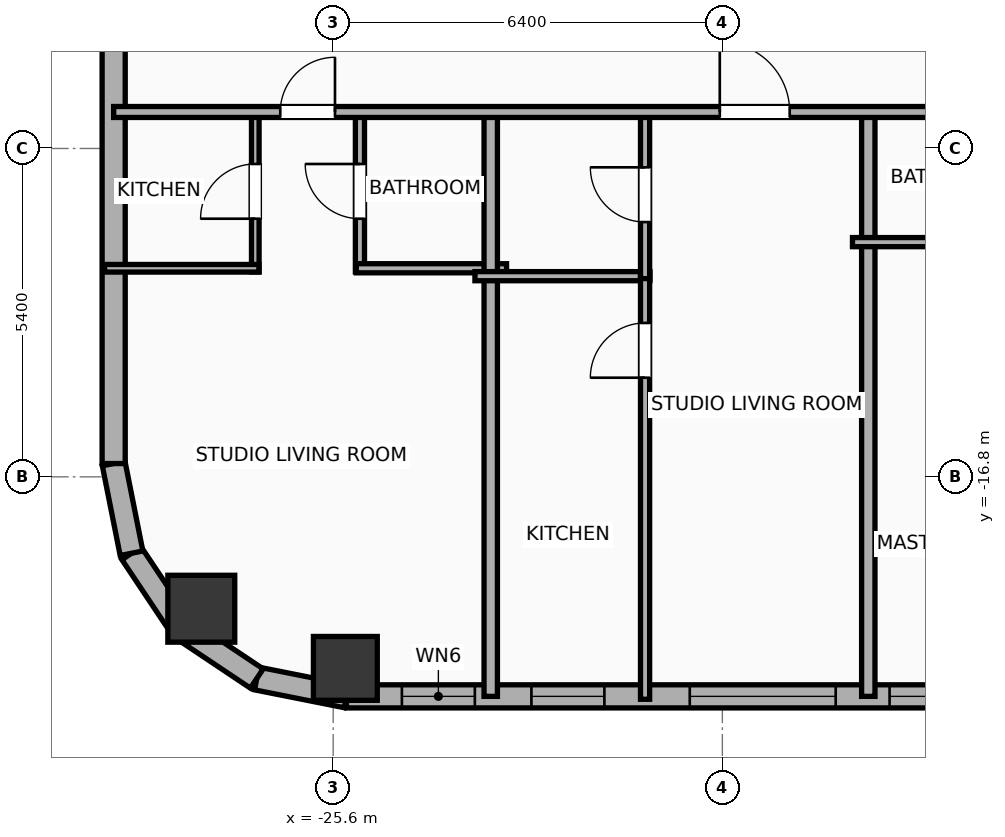
"""IFC4 building model, lengths in metres.
Left out: names, types, materials, properties, quantities, classifications, styles, units other than length and angle.
Written with IfcOpenShell. Run it as: python <this file> out.ifc"""

import sys

from ifc_helpers import new_model, si_unit, direction, frame, frame_2d, origin, origin_2d, place, context, subcontext, project, spatial, rectangle, hollow_rectangle, hollow_circle, extrude, element, fill, save


model = new_model("IFC4")
c1 = context("Model", 3, precision=1e-05, world=origin(), true_north=direction((0.0, 1.0)))
c2 = subcontext(c1, "Body", "Model", "MODEL_VIEW")
j1 = project(units=[si_unit("LENGTHUNIT", "METRE"), si_unit("PLANEANGLEUNIT", "RADIAN")], contexts=[c1])
p1 = place(None, origin())
s1 = spatial("IfcSite", under=j1, at=p1, CompositionType="ELEMENT")
p2 = place(p1, origin())
s2 = spatial("IfcBuilding", under=s1, at=p2, CompositionType="ELEMENT")
p3 = place(p2, frame((0.0, 0.0, 132.6)))
s3 = spatial("IfcBuildingStorey", under=s2, at=p3, CompositionType="ELEMENT", Elevation=132.6)
p4 = place(p3, frame((-25.4, -19.95, 0.0), z_axis=(0.0, 0.0, 1.0), x_axis=(1.0, 0.0, 0.0)))
e1 = element("IfcColumn", 1, at=p4, inside=s3, PredefinedType="COLUMN", context=c2, shape_type="SweptSolid", body=[
    extrude(hollow_rectangle(XDim=1.05, YDim=1.05, WallThickness=0.036, at=origin_2d()), origin(), (0.0, 0.0, 1.0), 3.9),
])
p5 = place(p3, frame((-27.769, -18.969, 0.0), z_axis=(0.0, 0.0, 1.0), x_axis=(1.0, 0.0, 0.0)))
e2 = element("IfcColumn", 2, at=p5, inside=s3, PredefinedType="COLUMN", context=c2, shape_type="SweptSolid", body=[
    extrude(hollow_circle(Radius=0.55, WallThickness=0.036, at=origin_2d()), origin(), (0.0, 0.0, 1.0), 3.9),
])
p6 = place(p3, frame((29.381, -20.41, 0.0), z_axis=(0.0, 0.0, 1.0), x_axis=(-1.0, 0.0, 0.0)))
e3 = element("IfcWall", 3, at=p6, inside=s3, PredefinedType="ELEMENTEDWALL", context=c2, shape_type="SweptSolid", body=[
    extrude(rectangle(XDim=54.763, YDim=0.38, at=frame_2d((27.381, 0.0))), origin(), (0.0, 0.0, 1.0), 3.65),
])
p7 = place(p6, frame((3.995, 0.0, 0.75)))
e4 = element("IfcOpeningElement", 4, at=p7, cuts=e3, PredefinedType="OPENING", context=c2, shape_type="SweptSolid", body=[
    extrude(rectangle(XDim=2.4, YDim=2.1, at=frame_2d((1.2, 1.05))), frame((0.0, 0.2, 0.0), z_axis=(0.0, -1.0, 0.0), x_axis=(1.0, 0.0, 0.0)), (0.0, 0.0, 1.0), 0.4),
])
p8 = place(p6, frame((18.486, 0.0, 0.75)))
e5 = element("IfcOpeningElement", 5, at=p8, cuts=e3, PredefinedType="OPENING", context=c2, shape_type="SweptSolid", body=[
    extrude(rectangle(XDim=2.4, YDim=2.1, at=frame_2d((1.2, 1.05))), frame((0.0, 0.2, 0.0), z_axis=(0.0, -1.0, 0.0), x_axis=(1.0, 0.0, 0.0)), (0.0, 0.0, 1.0), 0.4),
])
p9 = place(p6, frame((46.717, 0.0, 0.75)))
e6 = element("IfcOpeningElement", 6, at=p9, cuts=e3, PredefinedType="OPENING", context=c2, shape_type="SweptSolid", body=[
    extrude(rectangle(XDim=2.4, YDim=2.1, at=frame_2d((1.2, 1.05))), frame((0.0, 0.2, 0.0), z_axis=(0.0, -1.0, 0.0), x_axis=(1.0, 0.0, 0.0)), (0.0, 0.0, 1.0), 0.4),
])
p10 = place(p6, frame((52.651, 0.0, 0.75)))
e7 = element("IfcOpeningElement", 7, at=p10, cuts=e3, PredefinedType="OPENING", context=c2, shape_type="SweptSolid", body=[
    extrude(rectangle(XDim=1.2, YDim=2.05, at=frame_2d((0.6, 1.025))), frame((0.0, 0.2, 0.0), z_axis=(0.0, -1.0, 0.0), x_axis=(1.0, 0.0, 0.0)), (0.0, 0.0, 1.0), 0.4),
])
p11 = place(p6, frame((50.521, 0.0, 0.75)))
e8 = element("IfcOpeningElement", 8, at=p11, cuts=e3, PredefinedType="OPENING", context=c2, shape_type="SweptSolid", body=[
    extrude(rectangle(XDim=1.2, YDim=2.05, at=frame_2d((0.6, 1.025))), frame((0.0, 0.2, 0.0), z_axis=(0.0, -1.0, 0.0), x_axis=(1.0, 0.0, 0.0)), (0.0, 0.0, 1.0), 0.4),
])
p12 = place(p6, frame((40.191, 0.0, 0.75)))
e9 = element("IfcOpeningElement", 9, at=p12, cuts=e3, PredefinedType="OPENING", context=c2, shape_type="SweptSolid", body=[
    extrude(rectangle(XDim=1.2, YDim=2.05, at=frame_2d((0.6, 1.025))), frame((0.0, 0.2, 0.0), z_axis=(0.0, -1.0, 0.0), x_axis=(1.0, 0.0, 0.0)), (0.0, 0.0, 1.0), 0.4),
])
p13 = place(p6, frame((44.631, 0.0, 0.75)))
e10 = element("IfcOpeningElement", 10, at=p13, cuts=e3, PredefinedType="OPENING", context=c2, shape_type="SweptSolid", body=[
    extrude(rectangle(XDim=1.2, YDim=2.05, at=frame_2d((0.6, 1.025))), frame((0.0, 0.2, 0.0), z_axis=(0.0, -1.0, 0.0), x_axis=(1.0, 0.0, 0.0)), (0.0, 0.0, 1.0), 0.4),
])
p14 = place(p6, frame((36.561, 0.0, 0.75)))
e11 = element("IfcOpeningElement", 11, at=p14, cuts=e3, PredefinedType="OPENING", context=c2, shape_type="SweptSolid", body=[
    extrude(rectangle(XDim=1.2, YDim=2.05, at=frame_2d((0.6, 1.025))), frame((0.0, 0.2, 0.0), z_axis=(0.0, -1.0, 0.0), x_axis=(1.0, 0.0, 0.0)), (0.0, 0.0, 1.0), 0.4),
])
p15 = place(p6, frame((30.004, 0.0, 0.75)))
e12 = element("IfcOpeningElement", 12, at=p15, cuts=e3, PredefinedType="OPENING", context=c2, shape_type="SweptSolid", body=[
    extrude(rectangle(XDim=1.2, YDim=2.05, at=frame_2d((0.6, 1.025))), frame((0.0, 0.2, 0.0), z_axis=(0.0, -1.0, 0.0), x_axis=(1.0, 0.0, 0.0)), (0.0, 0.0, 1.0), 0.4),
])
p16 = place(p6, frame((33.599, 0.0, 0.75)))
e13 = element("IfcOpeningElement", 13, at=p16, cuts=e3, PredefinedType="OPENING", context=c2, shape_type="SweptSolid", body=[
    extrude(rectangle(XDim=1.2, YDim=2.05, at=frame_2d((0.6, 1.025))), frame((0.0, 0.2, 0.0), z_axis=(0.0, -1.0, 0.0), x_axis=(1.0, 0.0, 0.0)), (0.0, 0.0, 1.0), 0.4),
])
p17 = place(p6, frame((26.086, 0.0, 0.75)))
e14 = element("IfcOpeningElement", 14, at=p17, cuts=e3, PredefinedType="OPENING", context=c2, shape_type="SweptSolid", body=[
    extrude(rectangle(XDim=1.2, YDim=2.05, at=frame_2d((0.6, 1.025))), frame((0.0, 0.2, 0.0), z_axis=(0.0, -1.0, 0.0), x_axis=(1.0, 0.0, 0.0)), (0.0, 0.0, 1.0), 0.4),
])
p18 = place(p6, frame((22.626, 0.0, 0.75)))
e15 = element("IfcOpeningElement", 15, at=p18, cuts=e3, PredefinedType="OPENING", context=c2, shape_type="SweptSolid", body=[
    extrude(rectangle(XDim=1.2, YDim=2.05, at=frame_2d((0.6, 1.025))), frame((0.0, 0.2, 0.0), z_axis=(0.0, -1.0, 0.0), x_axis=(1.0, 0.0, 0.0)), (0.0, 0.0, 1.0), 0.4),
])
p19 = place(p6, frame((15.361, 0.0, 0.75)))
e16 = element("IfcOpeningElement", 16, at=p19, cuts=e3, PredefinedType="OPENING", context=c2, shape_type="SweptSolid", body=[
    extrude(rectangle(XDim=1.2, YDim=2.05, at=frame_2d((0.6, 1.025))), frame((0.0, 0.2, 0.0), z_axis=(0.0, -1.0, 0.0), x_axis=(1.0, 0.0, 0.0)), (0.0, 0.0, 1.0), 0.4),
])
p20 = place(p6, frame((8.986, 0.0, 0.75)))
e17 = element("IfcOpeningElement", 17, at=p20, cuts=e3, PredefinedType="OPENING", context=c2, shape_type="SweptSolid", body=[
    extrude(rectangle(XDim=1.2, YDim=2.05, at=frame_2d((0.6, 1.025))), frame((0.0, 0.2, 0.0), z_axis=(0.0, -1.0, 0.0), x_axis=(1.0, 0.0, 0.0)), (0.0, 0.0, 1.0), 0.4),
])
p21 = place(p6, frame((1.736, 0.0, 0.75)))
e18 = element("IfcOpeningElement", 18, at=p21, cuts=e3, PredefinedType="OPENING", context=c2, shape_type="SweptSolid", body=[
    extrude(rectangle(XDim=1.2, YDim=2.05, at=frame_2d((0.6, 1.025))), frame((0.0, 0.2, 0.0), z_axis=(0.0, -1.0, 0.0), x_axis=(1.0, 0.0, 0.0)), (0.0, 0.0, 1.0), 0.4),
])
p22 = place(p3, frame((-25.381, -20.41, 0.0), z_axis=(0.0, 0.0, 1.0), x_axis=(-0.980786132421, 0.195086038585, 0.0)))
e19 = element("IfcWall", 19, at=p22, inside=s3, PredefinedType="ELEMENTEDWALL", context=c2, shape_type="SweptSolid", body=[
    extrude(rectangle(XDim=1.504, YDim=0.38, at=frame_2d((0.752, 0.0))), origin(), (0.0, 0.0, 1.0), 3.65),
])
p23 = place(p3, frame((-26.857, -20.116, 0.0), z_axis=(0.0, 0.0, 1.0), x_axis=(-0.831468045563, 0.555572577804, 0.0)))
e20 = element("IfcWall", 20, at=p23, inside=s3, PredefinedType="ELEMENTEDWALL", context=c2, shape_type="SweptSolid", body=[
    extrude(rectangle(XDim=1.485, YDim=0.38, at=frame_2d((0.742, 0.0))), origin(), (0.0, 0.0, 1.0), 3.65),
])
p24 = place(p3, frame((-28.091, -19.292, 0.0), z_axis=(0.0, 0.0, 1.0), x_axis=(-0.555610286119, 0.831442848281, 0.0)))
e21 = element("IfcWall", 21, at=p24, inside=s3, PredefinedType="ELEMENTEDWALL", context=c2, shape_type="SweptSolid", body=[
    extrude(rectangle(XDim=1.485, YDim=0.38, at=frame_2d((0.743, 0.0))), origin(), (0.0, 0.0, 1.0), 3.65),
])
p25 = place(p3, frame((-28.917, -18.057, 0.0), z_axis=(0.0, 0.0, 1.0), x_axis=(-0.195086038585, 0.980786132421, 0.0)))
e22 = element("IfcWall", 22, at=p25, inside=s3, PredefinedType="ELEMENTEDWALL", context=c2, shape_type="SweptSolid", body=[
    extrude(rectangle(XDim=1.504, YDim=0.38, at=frame_2d((0.752, 0.0))), origin(), (0.0, 0.0, 1.0), 3.65),
])
p26 = place(p3, frame((-29.21, -16.581, 0.0), z_axis=(0.0, 0.0, 1.0), x_axis=(0.0, 1.0, 0.0)))
e23 = element("IfcWall", 23, at=p26, inside=s3, PredefinedType="ELEMENTEDWALL", context=c2, shape_type="SweptSolid", body=[
    extrude(rectangle(XDim=34.363, YDim=0.38, at=frame_2d((17.181, 0.0))), origin(), (0.0, 0.0, 1.0), 3.65),
])
p27 = place(p26, frame((31.437, 0.0, 0.75)))
e24 = element("IfcOpeningElement", 24, at=p27, cuts=e23, PredefinedType="OPENING", context=c2, shape_type="SweptSolid", body=[
    extrude(rectangle(XDim=1.2, YDim=2.05, at=frame_2d((0.6, 1.025))), frame((0.0, 0.2, 0.0), z_axis=(0.0, -1.0, 0.0), x_axis=(1.0, 0.0, 0.0)), (0.0, 0.0, 1.0), 0.4),
])
p28 = place(p26, frame((20.676, 0.0, 0.75)))
e25 = element("IfcOpeningElement", 25, at=p28, cuts=e23, PredefinedType="OPENING", context=c2, shape_type="SweptSolid", body=[
    extrude(rectangle(XDim=1.2, YDim=2.05, at=frame_2d((0.6, 1.025))), frame((0.0, 0.2, 0.0), z_axis=(0.0, -1.0, 0.0), x_axis=(1.0, 0.0, 0.0)), (0.0, 0.0, 1.0), 0.4),
])
p29 = place(p26, frame((11.426, 0.0, 0.75)))
e26 = element("IfcOpeningElement", 26, at=p29, cuts=e23, PredefinedType="OPENING", context=c2, shape_type="SweptSolid", body=[
    extrude(rectangle(XDim=1.2, YDim=2.05, at=frame_2d((0.6, 1.025))), frame((0.0, 0.2, 0.0), z_axis=(0.0, -1.0, 0.0), x_axis=(1.0, 0.0, 0.0)), (0.0, 0.0, 1.0), 0.4),
])
p30 = place(p3, frame((-26.881, -13.43, 0.0), z_axis=(0.0, 0.0, 1.0), x_axis=(0.0, 1.0, 0.0)))
e27 = element("IfcWall", 27, at=p30, inside=s3, PredefinedType="PARTITIONING", context=c2, shape_type="SweptSolid", body=[
    extrude(rectangle(XDim=2.65, YDim=0.125, at=frame_2d((1.325, 0.0))), origin(), (0.0, 0.0, 1.0), 3.65),
])
p31 = place(p30, frame((0.875, 0.0, 0.0)))
e28 = element("IfcOpeningElement", 28, at=p31, cuts=e27, PredefinedType="OPENING", context=c2, shape_type="SweptSolid", body=[
    extrude(rectangle(XDim=0.9, YDim=2.05, at=frame_2d((0.45, 1.025))), frame((0.0, 0.073, 0.0), z_axis=(0.0, -1.0, 0.0), x_axis=(1.0, 0.0, 0.0)), (0.0, 0.0, 1.0), 0.145),
])
p32 = place(p3, frame((-25.16, -13.43, 0.0), z_axis=(0.0, 0.0, 1.0), x_axis=(0.0, 1.0, 0.0)))
e29 = element("IfcWall", 29, at=p32, inside=s3, PredefinedType="PLUMBINGWALL", context=c2, shape_type="SweptSolid", body=[
    extrude(rectangle(XDim=2.65, YDim=0.15, at=frame_2d((1.325, 0.0))), origin(), (0.0, 0.0, 1.0), 3.65),
])
p33 = place(p32, frame((0.875, 0.0, 0.0)))
e30 = element("IfcOpeningElement", 30, at=p33, cuts=e29, PredefinedType="OPENING", context=c2, shape_type="SweptSolid", body=[
    extrude(rectangle(XDim=0.9, YDim=2.05, at=frame_2d((0.45, 1.025))), frame((0.0, 0.085, 0.0), z_axis=(0.0, -1.0, 0.0), x_axis=(1.0, 0.0, 0.0)), (0.0, 0.0, 1.0), 0.17),
])
p34 = place(p3, frame((-29.36, -13.37, 0.0), z_axis=(0.0, 0.0, 1.0), x_axis=(1.0, 0.0, 0.0)))
e31 = element("IfcWall", 31, at=p34, inside=s3, PredefinedType="PARTITIONING", context=c2, shape_type="SweptSolid", body=[
    extrude(rectangle(XDim=2.539, YDim=0.125, at=frame_2d((1.27, 0.0))), origin(), (0.0, 0.0, 1.0), 3.65),
])
p35 = place(p3, frame((-25.22, -13.37, 0.0), z_axis=(0.0, 0.0, 1.0), x_axis=(1.0, 0.0, 0.0)))
e32 = element("IfcWall", 32, at=p35, inside=s3, PredefinedType="PLUMBINGWALL", context=c2, shape_type="SweptSolid", body=[
    extrude(rectangle(XDim=2.471, YDim=0.15, at=frame_2d((1.235, 0.0))), origin(), (0.0, 0.0, 1.0), 3.65),
])
p36 = place(p3, frame((-23.009, -20.41, 0.0), z_axis=(0.0, 0.0, 1.0), x_axis=(0.0, 1.0, 0.0)))
e33 = element("IfcWall", 33, at=p36, inside=s3, PredefinedType="PARTITIONING", context=c2, shape_type="SweptSolid", body=[
    extrude(rectangle(XDim=9.69, YDim=0.22, at=frame_2d((4.845, 0.0))), origin(), (0.0, 0.0, 1.0), 3.65),
])
p37 = place(p3, frame((-23.269, -13.5, 0.0), z_axis=(0.0, 0.0, 1.0), x_axis=(1.0, 0.0, 0.0)))
e34 = element("IfcWall", 34, at=p37, inside=s3, PredefinedType="PLUMBINGWALL", context=c2, shape_type="SweptSolid", body=[
    extrude(rectangle(XDim=2.878, YDim=0.15, at=frame_2d((1.439, 0.0))), origin(), (0.0, 0.0, 1.0), 3.65),
])
p38 = place(p3, frame((-20.471, -20.458, 0.0), z_axis=(0.0, 0.0, 1.0), x_axis=(0.0, 1.0, 0.0)))
e35 = element("IfcWall", 35, at=p38, inside=s3, PredefinedType="PLUMBINGWALL", context=c2, shape_type="SweptSolid", body=[
    extrude(rectangle(XDim=6.998, YDim=0.15, at=frame_2d((3.499, 0.0))), origin(), (0.0, 0.0, 1.0), 3.65),
])
p39 = place(p38, frame((5.288, 0.0, 0.0)))
e36 = element("IfcOpeningElement", 36, at=p39, cuts=e35, PredefinedType="OPENING", context=c2, shape_type="SweptSolid", body=[
    extrude(rectangle(XDim=0.9, YDim=2.05, at=frame_2d((0.45, 1.025))), frame((0.0, 0.085, 0.0), z_axis=(0.0, -1.0, 0.0), x_axis=(1.0, 0.0, 0.0)), (0.0, 0.0, 1.0), 0.17),
])
p40 = place(p3, frame((-20.471, -13.54, 0.0), z_axis=(0.0, 0.0, 1.0), x_axis=(0.0, 1.0, 0.0)))
e37 = element("IfcWall", 37, at=p40, inside=s3, PredefinedType="PLUMBINGWALL", context=c2, shape_type="SweptSolid", body=[
    extrude(rectangle(XDim=2.76, YDim=0.15, at=frame_2d((1.38, 0.0))), origin(), (0.0, 0.0, 1.0), 3.65),
])
p41 = place(p40, frame((0.93, 0.0, 0.0)))
e38 = element("IfcOpeningElement", 38, at=p41, cuts=e37, PredefinedType="OPENING", context=c2, shape_type="SweptSolid", body=[
    extrude(rectangle(XDim=0.9, YDim=2.05, at=frame_2d((0.45, 1.025))), frame((0.0, 0.085, 0.0), z_axis=(0.0, -1.0, 0.0), x_axis=(1.0, 0.0, 0.0)), (0.0, 0.0, 1.0), 0.17),
])
p42 = place(p3, frame((-16.8, -20.41, 0.0), z_axis=(0.0, 0.0, 1.0), x_axis=(0.0, 1.0, 0.0)))
e39 = element("IfcWall", 39, at=p42, inside=s3, PredefinedType="PARTITIONING", context=c2, shape_type="SweptSolid", body=[
    extrude(rectangle(XDim=9.69, YDim=0.22, at=frame_2d((4.845, 0.0))), origin(), (0.0, 0.0, 1.0), 3.65),
])
p43 = place(p3, frame((-17.06, -12.94, 0.0), z_axis=(0.0, 0.0, 1.0), x_axis=(1.0, 0.0, 0.0)))
e40 = element("IfcWall", 40, at=p43, inside=s3, PredefinedType="PLUMBINGWALL", context=c2, shape_type="SweptSolid", body=[
    extrude(rectangle(XDim=3.68, YDim=0.15, at=frame_2d((1.84, 0.0))), origin(), (0.0, 0.0, 1.0), 3.65),
])
p44 = place(p3, frame((-29.21, -10.8, 0.0), z_axis=(0.0, 0.0, 1.0), x_axis=(1.0, 0.0, 0.0)))
e41 = element("IfcWall", 41, at=p44, inside=s3, PredefinedType="PARTITIONING", context=c2, shape_type="SweptSolid", body=[
    extrude(rectangle(XDim=62.42, YDim=0.18, at=frame_2d((31.21, 0.0))), origin(), (0.0, 0.0, 1.0), 3.65),
])
p45 = place(p44, frame((2.74, 0.0, 0.0)))
e42 = element("IfcOpeningElement", 42, at=p45, cuts=e41, PredefinedType="OPENING", context=c2, shape_type="SweptSolid", body=[
    extrude(rectangle(XDim=0.9, YDim=2.05, at=frame_2d((0.45, 1.025))), frame((0.0, 0.1, 0.0), z_axis=(0.0, -1.0, 0.0), x_axis=(1.0, 0.0, 0.0)), (0.0, 0.0, 1.0), 0.2),
])
p46 = place(p44, frame((9.968, 0.0, 0.0)))
e43 = element("IfcOpeningElement", 43, at=p46, cuts=e41, PredefinedType="OPENING", context=c2, shape_type="SweptSolid", body=[
    extrude(rectangle(XDim=1.15, YDim=2.05, at=frame_2d((0.575, 1.025))), frame((0.0, 0.1, 0.0), z_axis=(0.0, -1.0, 0.0), x_axis=(1.0, 0.0, 0.0)), (0.0, 0.0, 1.0), 0.2),
])
p47 = place(p44, frame((17.227, 0.0, 0.0)))
e44 = element("IfcOpeningElement", 44, at=p47, cuts=e41, PredefinedType="OPENING", context=c2, shape_type="SweptSolid", body=[
    extrude(rectangle(XDim=1.15, YDim=2.05, at=frame_2d((0.575, 1.025))), frame((0.0, 0.1, 0.0), z_axis=(0.0, -1.0, 0.0), x_axis=(1.0, 0.0, 0.0)), (0.0, 0.0, 1.0), 0.2),
])
p48 = place(p44, frame((28.157, 0.0, 0.0)))
e45 = element("IfcOpeningElement", 45, at=p48, cuts=e41, PredefinedType="OPENING", context=c2, shape_type="SweptSolid", body=[
    extrude(rectangle(XDim=1.15, YDim=2.05, at=frame_2d((0.575, 1.025))), frame((0.0, 0.1, 0.0), z_axis=(0.0, -1.0, 0.0), x_axis=(1.0, 0.0, 0.0)), (0.0, 0.0, 1.0), 0.2),
])
p49 = place(p44, frame((38.512, 0.0, 0.0)))
e46 = element("IfcOpeningElement", 46, at=p49, cuts=e41, PredefinedType="OPENING", context=c2, shape_type="SweptSolid", body=[
    extrude(rectangle(XDim=1.15, YDim=2.05, at=frame_2d((0.575, 1.025))), frame((0.0, 0.1, 0.0), z_axis=(0.0, -1.0, 0.0), x_axis=(1.0, 0.0, 0.0)), (0.0, 0.0, 1.0), 0.2),
])
p50 = place(p44, frame((49.33, 0.0, 0.0)))
e47 = element("IfcOpeningElement", 47, at=p50, cuts=e41, PredefinedType="OPENING", context=c2, shape_type="SweptSolid", body=[
    extrude(rectangle(XDim=1.15, YDim=2.05, at=frame_2d((0.575, 1.025))), frame((0.0, 0.1, 0.0), z_axis=(0.0, -1.0, 0.0), x_axis=(1.0, 0.0, 0.0)), (0.0, 0.0, 1.0), 0.2),
])
p51 = place(p44, frame((58.237, 0.0, 0.0)))
e48 = element("IfcOpeningElement", 48, at=p51, cuts=e41, PredefinedType="OPENING", context=c2, shape_type="SweptSolid", body=[
    extrude(rectangle(XDim=1.15, YDim=2.05, at=frame_2d((0.575, 1.025))), frame((0.0, 0.1, 0.0), z_axis=(0.0, -1.0, 0.0), x_axis=(1.0, 0.0, 0.0)), (0.0, 0.0, 1.0), 0.2),
])
p52 = place(p9, origin())
e49 = element("IfcWindow", 49, at=p52, inside=s3, PartitioningType="SINGLE_PANEL", PredefinedType="WINDOW", context=c2, shape_type="SweptSolid", body=[
    extrude(rectangle(XDim=2.4, YDim=2.1, at=frame_2d((1.2, 1.05))), frame((0.0, 0.03, 0.0), z_axis=(0.0, -1.0, 0.0), x_axis=(1.0, 0.0, 0.0)), (0.0, 0.0, 1.0), 0.06),
])
fill(e6, e49)
p53 = place(p10, origin())
e50 = element("IfcWindow", 50, at=p53, inside=s3, PartitioningType="SINGLE_PANEL", PredefinedType="WINDOW", context=c2, shape_type="SweptSolid", body=[
    extrude(rectangle(XDim=1.2, YDim=2.05, at=frame_2d((0.6, 1.025))), frame((0.0, 0.03, 0.0), z_axis=(0.0, -1.0, 0.0), x_axis=(1.0, 0.0, 0.0)), (0.0, 0.0, 1.0), 0.06),
])
fill(e7, e50)
p54 = place(p11, origin())
e51 = element("IfcWindow", 51, at=p54, inside=s3, PartitioningType="SINGLE_PANEL", PredefinedType="WINDOW", context=c2, shape_type="SweptSolid", body=[
    extrude(rectangle(XDim=1.2, YDim=2.05, at=frame_2d((0.6, 1.025))), frame((0.0, 0.03, 0.0), z_axis=(0.0, -1.0, 0.0), x_axis=(1.0, 0.0, 0.0)), (0.0, 0.0, 1.0), 0.06),
])
fill(e8, e51)
p55 = place(p13, origin())
e52 = element("IfcWindow", 52, at=p55, inside=s3, PartitioningType="SINGLE_PANEL", PredefinedType="WINDOW", context=c2, shape_type="SweptSolid", body=[
    extrude(rectangle(XDim=1.2, YDim=2.05, at=frame_2d((0.6, 1.025))), frame((0.0, 0.03, 0.0), z_axis=(0.0, -1.0, 0.0), x_axis=(1.0, 0.0, 0.0)), (0.0, 0.0, 1.0), 0.06),
])
fill(e10, e52)
p56 = place(p31, origin())
e53 = element("IfcDoor", 53, at=p56, inside=s3, OperationType="SINGLE_SWING_LEFT", PredefinedType="DOOR", context=c2, shape_type="SweptSolid", body=[
    extrude(rectangle(XDim=0.9, YDim=2.05, at=frame_2d((0.45, 1.025))), frame((0.0, 0.025, 0.0), z_axis=(0.0, -1.0, 0.0), x_axis=(1.0, 0.0, 0.0)), (0.0, 0.0, 1.0), 0.05),
])
fill(e28, e53)
p57 = place(p33, origin())
e54 = element("IfcDoor", 54, at=p57, inside=s3, OperationType="SINGLE_SWING_RIGHT", PredefinedType="DOOR", context=c2, shape_type="SweptSolid", body=[
    extrude(rectangle(XDim=0.9, YDim=2.05, at=frame_2d((0.45, 1.025))), frame((0.0, 0.025, 0.0), z_axis=(0.0, -1.0, 0.0), x_axis=(1.0, 0.0, 0.0)), (0.0, 0.0, 1.0), 0.05),
])
fill(e30, e54)
p58 = place(p39, origin())
e55 = element("IfcDoor", 55, at=p58, inside=s3, OperationType="SINGLE_SWING_LEFT", PredefinedType="DOOR", context=c2, shape_type="SweptSolid", body=[
    extrude(rectangle(XDim=0.9, YDim=2.05, at=frame_2d((0.45, 1.025))), frame((0.0, 0.025, 0.0), z_axis=(0.0, -1.0, 0.0), x_axis=(1.0, 0.0, 0.0)), (0.0, 0.0, 1.0), 0.05),
])
fill(e36, e55)
p59 = place(p41, origin())
e56 = element("IfcDoor", 56, at=p59, inside=s3, OperationType="SINGLE_SWING_RIGHT", PredefinedType="DOOR", context=c2, shape_type="SweptSolid", body=[
    extrude(rectangle(XDim=0.9, YDim=2.05, at=frame_2d((0.45, 1.025))), frame((0.0, 0.025, 0.0), z_axis=(0.0, -1.0, 0.0), x_axis=(1.0, 0.0, 0.0)), (0.0, 0.0, 1.0), 0.05),
])
fill(e38, e56)
p60 = place(p45, origin())
e57 = element("IfcDoor", 57, at=p60, inside=s3, OperationType="SINGLE_SWING_RIGHT", PredefinedType="DOOR", context=c2, shape_type="SweptSolid", body=[
    extrude(rectangle(XDim=0.9, YDim=2.05, at=frame_2d((0.45, 1.025))), frame((0.0, 0.025, 0.0), z_axis=(0.0, -1.0, 0.0), x_axis=(1.0, 0.0, 0.0)), (0.0, 0.0, 1.0), 0.05),
])
fill(e42, e57)
p61 = place(p46, origin())
e58 = element("IfcDoor", 58, at=p61, inside=s3, OperationType="SINGLE_SWING_LEFT", PredefinedType="DOOR", context=c2, shape_type="SweptSolid", body=[
    extrude(rectangle(XDim=1.15, YDim=2.05, at=frame_2d((0.575, 1.025))), frame((0.0, 0.025, 0.0), z_axis=(0.0, -1.0, 0.0), x_axis=(1.0, 0.0, 0.0)), (0.0, 0.0, 1.0), 0.05),
])
fill(e43, e58)
save(model, sys.argv[1])
